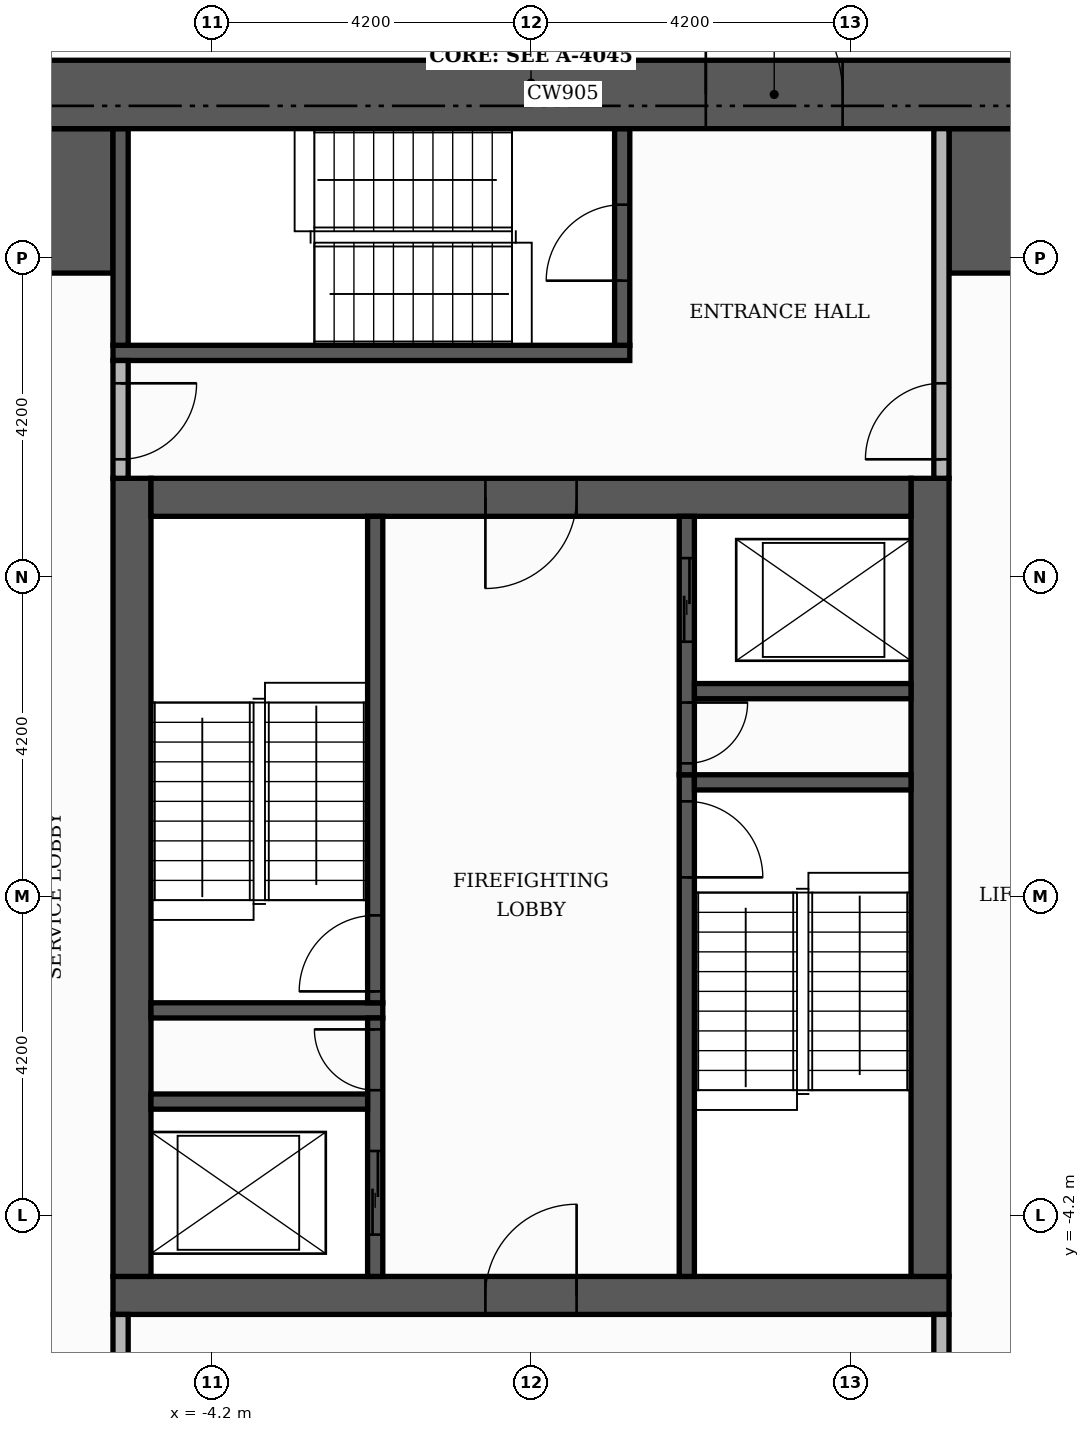
"""IFC4 building model, lengths in metres.
Left out: names, types, materials, properties, quantities, classifications, styles, units other than length and angle.
Written with IfcOpenShell. Run it as: python <this file> out.ifc"""

import sys

from ifc_helpers import new_model, si_unit, direction, frame, frame_2d, origin, place, context, subcontext, project, spatial, rectangle, extrude, element, fill, save


model = new_model("IFC4")
c1 = context("Model", 3, precision=1e-05, world=origin(), true_north=direction((0.0, 1.0)))
c2 = subcontext(c1, "Body", "Model", "MODEL_VIEW")
j1 = project(units=[si_unit("LENGTHUNIT", "METRE"), si_unit("PLANEANGLEUNIT", "RADIAN")], contexts=[c1])
p1 = place(None, origin())
s1 = spatial("IfcSite", under=j1, at=p1, CompositionType="ELEMENT")
p2 = place(p1, origin())
s2 = spatial("IfcBuilding", under=s1, at=p2, CompositionType="ELEMENT")
p3 = place(p2, frame((0.0, 0.0, 283.5)))
s3 = spatial("IfcBuildingStorey", under=s2, at=p3, CompositionType="ELEMENT", Elevation=283.5)
p4 = place(p3, frame((-5.5, -5.25, 0.0), z_axis=(0.0, 0.0, 1.0), x_axis=(1.0, 0.0, 0.0)))
e1 = element("IfcWall", 1, at=p4, inside=s3, PredefinedType="SHEAR", context=c2, shape_type="SweptSolid", body=[
    extrude(rectangle(XDim=11.0, YDim=0.5, at=frame_2d((5.5, 0.0))), origin(), (0.0, 0.0, 1.0), 3.4),
])
p5 = place(p4, frame((4.9, 0.0, 0.0)))
e2 = element("IfcOpeningElement", 2, at=p5, cuts=e1, PredefinedType="OPENING", context=c2, shape_type="SweptSolid", body=[
    extrude(rectangle(XDim=1.2, YDim=2.1, at=frame_2d((0.6, 1.05))), frame((0.0, 0.26, 0.0), z_axis=(0.0, -1.0, 0.0), x_axis=(1.0, 0.0, 0.0)), (0.0, 0.0, 1.0), 0.52),
])
for number, where, z_axis, x_axis in (
    (3, (-5.25, -5.0, 0.0), (0.0, 0.0, 1.0), (0.0, 1.0, 0.0)),
    (4, (5.25, -5.0, 0.0), (0.0, 0.0, 1.0), (0.0, 1.0, 0.0)),
):
    element("IfcWall", number, at=place(p3, frame(where, z_axis=z_axis, x_axis=x_axis)), inside=s3, PredefinedType="SHEAR", context=c2, shape_type="SweptSolid", body=[
        extrude(rectangle(XDim=10.5, YDim=0.5, at=frame_2d((5.25, 0.0))), origin(), (0.0, 0.0, 1.0), 3.4),
    ])
p6 = place(p3, frame((-5.0, 5.25, 0.0), z_axis=(0.0, 0.0, 1.0), x_axis=(1.0, 0.0, 0.0)))
e5 = element("IfcWall", 5, at=p6, inside=s3, PredefinedType="SHEAR", context=c2, shape_type="SweptSolid", body=[
    extrude(rectangle(XDim=10.0, YDim=0.5, at=frame_2d((5.0, 0.0))), origin(), (0.0, 0.0, 1.0), 3.4),
])
p7 = place(p6, frame((4.4, 0.0, 0.0)))
e6 = element("IfcOpeningElement", 6, at=p7, cuts=e5, PredefinedType="OPENING", context=c2, shape_type="SweptSolid", body=[
    extrude(rectangle(XDim=1.2, YDim=2.1, at=frame_2d((0.6, 1.05))), frame((0.0, 0.26, 0.0), z_axis=(0.0, -1.0, 0.0), x_axis=(1.0, 0.0, 0.0)), (0.0, 0.0, 1.0), 0.52),
])
for number, where, z_axis, x_axis in (
    (7, (-10.1, 9.15, 0.0), (0.0, 0.0, 1.0), (1.0, 0.0, 0.0)),
    (8, (5.5, 9.15, 0.0), (0.0, 0.0, 1.0), (1.0, 0.0, 0.0)),
):
    element("IfcWall", number, at=place(p3, frame(where, z_axis=z_axis, x_axis=x_axis)), inside=s3, PredefinedType="SHEAR", context=c2, shape_type="SweptSolid", body=[
        extrude(rectangle(XDim=4.6, YDim=1.9, at=frame_2d((2.3, 0.0))), origin(), (0.0, 0.0, 1.0), 3.4),
    ])
p8 = place(p3, frame((2.05, -5.0, 0.0), z_axis=(0.0, 0.0, 1.0), x_axis=(0.0, 1.0, 0.0)))
e9 = element("IfcWall", 9, at=p8, inside=s3, PredefinedType="SHEAR", context=c2, shape_type="SweptSolid", body=[
    extrude(rectangle(XDim=6.6, YDim=0.2, at=frame_2d((3.3, 0.0))), origin(), (0.0, 0.0, 1.0), 3.4),
])
p9 = place(p8, frame((5.25, 0.0, 0.0)))
e10 = element("IfcOpeningElement", 10, at=p9, cuts=e9, PredefinedType="OPENING", context=c2, shape_type="SweptSolid", body=[
    extrude(rectangle(XDim=1.0, YDim=2.1, at=frame_2d((0.5, 1.05))), frame((0.0, 0.11, 0.0), z_axis=(0.0, -1.0, 0.0), x_axis=(1.0, 0.0, 0.0)), (0.0, 0.0, 1.0), 0.22),
])
p10 = place(p3, frame((-5.0, -1.5, 0.0), z_axis=(0.0, 0.0, 1.0), x_axis=(1.0, 0.0, 0.0)))
e11 = element("IfcWall", 11, at=p10, inside=s3, PredefinedType="SHEAR", context=c2, shape_type="SweptSolid", body=[
    extrude(rectangle(XDim=3.05, YDim=0.2, at=frame_2d((1.525, 0.0))), origin(), (0.0, 0.0, 1.0), 3.4),
])
p11 = place(p3, frame((-2.05, -1.4, 0.0), z_axis=(0.0, 0.0, 1.0), x_axis=(0.0, 1.0, 0.0)))
e12 = element("IfcWall", 12, at=p11, inside=s3, PredefinedType="SHEAR", context=c2, shape_type="SweptSolid", body=[
    extrude(rectangle(XDim=6.4, YDim=0.2, at=frame_2d((3.2, 0.0))), origin(), (0.0, 0.0, 1.0), 3.4),
])
p12 = place(p11, frame((0.15, 0.0, 0.0)))
e13 = element("IfcOpeningElement", 13, at=p12, cuts=e12, PredefinedType="OPENING", context=c2, shape_type="SweptSolid", body=[
    extrude(rectangle(XDim=1.0, YDim=2.1, at=frame_2d((0.5, 1.05))), frame((0.0, 0.11, 0.0), z_axis=(0.0, -1.0, 0.0), x_axis=(1.0, 0.0, 0.0)), (0.0, 0.0, 1.0), 0.22),
])
p13 = place(p3, frame((2.15, 1.5, 0.0), z_axis=(0.0, 0.0, 1.0), x_axis=(1.0, 0.0, 0.0)))
e14 = element("IfcWall", 14, at=p13, inside=s3, PredefinedType="SHEAR", context=c2, shape_type="SweptSolid", body=[
    extrude(rectangle(XDim=2.85, YDim=0.2, at=frame_2d((1.425, 0.0))), origin(), (0.0, 0.0, 1.0), 3.4),
])
p14 = place(p3, frame((-5.5, 7.15, 0.0), z_axis=(0.0, 0.0, 1.0), x_axis=(1.0, 0.0, 0.0)))
e15 = element("IfcWall", 15, at=p14, inside=s3, PredefinedType="SHEAR", context=c2, shape_type="SweptSolid", body=[
    extrude(rectangle(XDim=6.8, YDim=0.2, at=frame_2d((3.4, 0.0))), origin(), (0.0, 0.0, 1.0), 3.4),
])
p15 = place(p3, frame((-5.4, 7.25, 0.0), z_axis=(0.0, 0.0, 1.0), x_axis=(0.0, 1.0, 0.0)))
e16 = element("IfcWall", 16, at=p15, inside=s3, PredefinedType="SHEAR", context=c2, shape_type="SweptSolid", body=[
    extrude(rectangle(XDim=2.85, YDim=0.2, at=frame_2d((1.425, 0.0))), origin(), (0.0, 0.0, 1.0), 3.4),
])
p16 = place(p3, frame((1.2, 7.25, 0.0), z_axis=(0.0, 0.0, 1.0), x_axis=(0.0, 1.0, 0.0)))
e17 = element("IfcWall", 17, at=p16, inside=s3, PredefinedType="SHEAR", context=c2, shape_type="SweptSolid", body=[
    extrude(rectangle(XDim=2.85, YDim=0.2, at=frame_2d((1.425, 0.0))), origin(), (0.0, 0.0, 1.0), 3.4),
])
p17 = place(p16, frame((0.85, 0.0, 0.0)))
e18 = element("IfcOpeningElement", 18, at=p17, cuts=e17, PredefinedType="OPENING", context=c2, shape_type="SweptSolid", body=[
    extrude(rectangle(XDim=1.0, YDim=2.1, at=frame_2d((0.5, 1.05))), frame((0.0, 0.11, 0.0), z_axis=(0.0, -1.0, 0.0), x_axis=(1.0, 0.0, 0.0)), (0.0, 0.0, 1.0), 0.22),
])
p18 = place(p3, frame((-2.05, -5.0, 0.0), z_axis=(0.0, 0.0, 1.0), x_axis=(0.0, 1.0, 0.0)))
e19 = element("IfcWall", 19, at=p18, inside=s3, PredefinedType="SHEAR", context=c2, shape_type="SweptSolid", body=[
    extrude(rectangle(XDim=3.4, YDim=0.2, at=frame_2d((1.7, 0.0))), origin(), (0.0, 0.0, 1.0), 3.4),
])
p19 = place(p18, frame((0.55, 0.0, 0.0)))
e20 = element("IfcOpeningElement", 20, at=p19, cuts=e19, PredefinedType="OPENING", context=c2, shape_type="SweptSolid", body=[
    extrude(rectangle(XDim=1.1, YDim=2.1, at=frame_2d((0.55, 1.05))), frame((0.0, 0.11, 0.0), z_axis=(0.0, -1.0, 0.0), x_axis=(1.0, 0.0, 0.0)), (0.0, 0.0, 1.0), 0.22),
])
p20 = place(p18, frame((2.45, 0.0, 0.0)))
e21 = element("IfcOpeningElement", 21, at=p20, cuts=e19, PredefinedType="OPENING", context=c2, shape_type="SweptSolid", body=[
    extrude(rectangle(XDim=0.8, YDim=2.1, at=frame_2d((0.4, 1.05))), frame((0.0, 0.11, 0.0), z_axis=(0.0, -1.0, 0.0), x_axis=(1.0, 0.0, 0.0)), (0.0, 0.0, 1.0), 0.22),
])
p21 = place(p3, frame((-5.0, -2.7, 0.0), z_axis=(0.0, 0.0, 1.0), x_axis=(1.0, 0.0, 0.0)))
e22 = element("IfcWall", 22, at=p21, inside=s3, PredefinedType="SHEAR", context=c2, shape_type="SweptSolid", body=[
    extrude(rectangle(XDim=2.85, YDim=0.2, at=frame_2d((1.425, 0.0))), origin(), (0.0, 0.0, 1.0), 3.4),
])
p22 = place(p3, frame((2.05, 1.6, 0.0), z_axis=(0.0, 0.0, 1.0), x_axis=(0.0, 1.0, 0.0)))
e23 = element("IfcWall", 23, at=p22, inside=s3, PredefinedType="SHEAR", context=c2, shape_type="SweptSolid", body=[
    extrude(rectangle(XDim=3.4, YDim=0.2, at=frame_2d((1.7, 0.0))), origin(), (0.0, 0.0, 1.0), 3.4),
])
p23 = place(p22, frame((1.75, 0.0, 0.0)))
e24 = element("IfcOpeningElement", 24, at=p23, cuts=e23, PredefinedType="OPENING", context=c2, shape_type="SweptSolid", body=[
    extrude(rectangle(XDim=1.1, YDim=2.1, at=frame_2d((0.55, 1.05))), frame((0.0, 0.11, 0.0), z_axis=(0.0, -1.0, 0.0), x_axis=(1.0, 0.0, 0.0)), (0.0, 0.0, 1.0), 0.22),
])
p24 = place(p22, frame((0.15, 0.0, 0.0)))
e25 = element("IfcOpeningElement", 25, at=p24, cuts=e23, PredefinedType="OPENING", context=c2, shape_type="SweptSolid", body=[
    extrude(rectangle(XDim=0.8, YDim=2.1, at=frame_2d((0.4, 1.05))), frame((0.0, 0.11, 0.0), z_axis=(0.0, -1.0, 0.0), x_axis=(1.0, 0.0, 0.0)), (0.0, 0.0, 1.0), 0.22),
])
p25 = place(p3, frame((2.15, 2.7, 0.0), z_axis=(0.0, 0.0, 1.0), x_axis=(1.0, 0.0, 0.0)))
e26 = element("IfcWall", 26, at=p25, inside=s3, PredefinedType="SHEAR", context=c2, shape_type="SweptSolid", body=[
    extrude(rectangle(XDim=2.85, YDim=0.2, at=frame_2d((1.425, 0.0))), origin(), (0.0, 0.0, 1.0), 3.4),
])
p26 = place(p3, frame((-11.0, 10.55, 0.0), z_axis=(0.0, 0.0, 1.0), x_axis=(1.0, 0.0, 0.0)))
e27 = element("IfcWall", 27, at=p26, inside=s3, PredefinedType="SHEAR", context=c2, shape_type="SweptSolid", body=[
    extrude(rectangle(XDim=22.0, YDim=0.9, at=frame_2d((11.0, 0.0))), origin(), (0.0, 0.0, 1.0), 3.4),
])
p27 = place(p26, frame((13.3, 0.0, 0.0)))
e28 = element("IfcOpeningElement", 28, at=p27, cuts=e27, PredefinedType="OPENING", context=c2, shape_type="SweptSolid", body=[
    extrude(rectangle(XDim=1.8, YDim=2.2, at=frame_2d((0.9, 1.1))), frame((0.0, 0.46, 0.0), z_axis=(0.0, -1.0, 0.0), x_axis=(1.0, 0.0, 0.0)), (0.0, 0.0, 1.0), 0.92),
])
p28 = place(p3, frame((-5.4, -10.1, 0.0), z_axis=(0.0, 0.0, 1.0), x_axis=(0.0, 1.0, 0.0)))
e29 = element("IfcWall", 29, at=p28, inside=s3, PredefinedType="PARTITIONING", context=c2, shape_type="SweptSolid", body=[
    extrude(rectangle(XDim=4.6, YDim=0.2, at=frame_2d((2.3, 0.0))), origin(), (0.0, 0.0, 1.0), 3.4),
])
p29 = place(p28, frame((2.9, 0.0, 0.0)))
e30 = element("IfcOpeningElement", 30, at=p29, cuts=e29, PredefinedType="OPENING", context=c2, shape_type="SweptSolid", body=[
    extrude(rectangle(XDim=1.0, YDim=2.1, at=frame_2d((0.5, 1.05))), frame((0.0, 0.11, 0.0), z_axis=(0.0, -1.0, 0.0), x_axis=(1.0, 0.0, 0.0)), (0.0, 0.0, 1.0), 0.22),
])
p30 = place(p3, frame((5.4, -10.1, 0.0), z_axis=(0.0, 0.0, 1.0), x_axis=(0.0, 1.0, 0.0)))
e31 = element("IfcWall", 31, at=p30, inside=s3, PredefinedType="PARTITIONING", context=c2, shape_type="SweptSolid", body=[
    extrude(rectangle(XDim=4.6, YDim=0.2, at=frame_2d((2.3, 0.0))), origin(), (0.0, 0.0, 1.0), 3.4),
])
p31 = place(p30, frame((2.9, 0.0, 0.0)))
e32 = element("IfcOpeningElement", 32, at=p31, cuts=e31, PredefinedType="OPENING", context=c2, shape_type="SweptSolid", body=[
    extrude(rectangle(XDim=1.0, YDim=2.1, at=frame_2d((0.5, 1.05))), frame((0.0, 0.11, 0.0), z_axis=(0.0, -1.0, 0.0), x_axis=(1.0, 0.0, 0.0)), (0.0, 0.0, 1.0), 0.22),
])
p32 = place(p3, frame((-5.4, 5.5, 0.0), z_axis=(0.0, 0.0, 1.0), x_axis=(0.0, 1.0, 0.0)))
e33 = element("IfcWall", 33, at=p32, inside=s3, PredefinedType="PARTITIONING", context=c2, shape_type="SweptSolid", body=[
    extrude(rectangle(XDim=1.55, YDim=0.2, at=frame_2d((0.775, 0.0))), origin(), (0.0, 0.0, 1.0), 3.4),
])
p33 = place(p32, frame((0.25, 0.0, 0.0)))
e34 = element("IfcOpeningElement", 34, at=p33, cuts=e33, PredefinedType="OPENING", context=c2, shape_type="SweptSolid", body=[
    extrude(rectangle(XDim=1.0, YDim=2.1, at=frame_2d((0.5, 1.05))), frame((0.0, 0.11, 0.0), z_axis=(0.0, -1.0, 0.0), x_axis=(1.0, 0.0, 0.0)), (0.0, 0.0, 1.0), 0.22),
])
p34 = place(p3, frame((5.4, 5.5, 0.0), z_axis=(0.0, 0.0, 1.0), x_axis=(0.0, 1.0, 0.0)))
e35 = element("IfcWall", 35, at=p34, inside=s3, PredefinedType="PARTITIONING", context=c2, shape_type="SweptSolid", body=[
    extrude(rectangle(XDim=4.6, YDim=0.2, at=frame_2d((2.3, 0.0))), origin(), (0.0, 0.0, 1.0), 3.4),
])
p35 = place(p34, frame((0.25, 0.0, 0.0)))
e36 = element("IfcOpeningElement", 36, at=p35, cuts=e35, PredefinedType="OPENING", context=c2, shape_type="SweptSolid", body=[
    extrude(rectangle(XDim=1.0, YDim=2.1, at=frame_2d((0.5, 1.05))), frame((0.0, 0.11, 0.0), z_axis=(0.0, -1.0, 0.0), x_axis=(1.0, 0.0, 0.0)), (0.0, 0.0, 1.0), 0.22),
])
p36 = place(p23, origin())
e37 = element("IfcDoor", 37, at=p36, inside=s3, OperationType="SLIDING_TO_LEFT", PredefinedType="DOOR", context=c2, shape_type="SweptSolid", body=[
    extrude(rectangle(XDim=1.1, YDim=2.1, at=frame_2d((0.55, 1.05))), frame((0.0, 0.025, 0.0), z_axis=(0.0, -1.0, 0.0), x_axis=(1.0, 0.0, 0.0)), (0.0, 0.0, 1.0), 0.05),
])
fill(e24, e37)
p37 = place(p19, origin())
e38 = element("IfcDoor", 38, at=p37, inside=s3, OperationType="SLIDING_TO_LEFT", PredefinedType="DOOR", context=c2, shape_type="SweptSolid", body=[
    extrude(rectangle(XDim=1.1, YDim=2.1, at=frame_2d((0.55, 1.05))), frame((0.0, 0.025, 0.0), z_axis=(0.0, -1.0, 0.0), x_axis=(1.0, 0.0, 0.0)), (0.0, 0.0, 1.0), 0.05),
])
fill(e20, e38)
p38 = place(p12, origin())
e39 = element("IfcDoor", 39, at=p38, inside=s3, OperationType="SINGLE_SWING_LEFT", PredefinedType="DOOR", context=c2, shape_type="SweptSolid", body=[
    extrude(rectangle(XDim=1.0, YDim=2.1, at=frame_2d((0.5, 1.05))), frame((0.0, 0.025, 0.0), z_axis=(0.0, -1.0, 0.0), x_axis=(1.0, 0.0, 0.0)), (0.0, 0.0, 1.0), 0.05),
])
fill(e13, e39)
p39 = place(p9, frame((1.0, 0.0, 0.0), z_axis=(0.0, 0.0, 1.0), x_axis=(-1.0, 0.0, 0.0)))
e40 = element("IfcDoor", 40, at=p39, inside=s3, OperationType="SINGLE_SWING_LEFT", PredefinedType="DOOR", context=c2, shape_type="SweptSolid", body=[
    extrude(rectangle(XDim=1.0, YDim=2.1, at=frame_2d((0.5, 1.05))), frame((0.0, 0.025, 0.0), z_axis=(0.0, -1.0, 0.0), x_axis=(1.0, 0.0, 0.0)), (0.0, 0.0, 1.0), 0.05),
])
fill(e10, e40)
p40 = place(p24, frame((0.8, 0.0, 0.0), z_axis=(0.0, 0.0, 1.0), x_axis=(-1.0, 0.0, 0.0)))
e41 = element("IfcDoor", 41, at=p40, inside=s3, OperationType="SINGLE_SWING_RIGHT", PredefinedType="DOOR", context=c2, shape_type="SweptSolid", body=[
    extrude(rectangle(XDim=0.8, YDim=2.1, at=frame_2d((0.4, 1.05))), frame((0.0, 0.025, 0.0), z_axis=(0.0, -1.0, 0.0), x_axis=(1.0, 0.0, 0.0)), (0.0, 0.0, 1.0), 0.05),
])
fill(e25, e41)
p41 = place(p20, origin())
e42 = element("IfcDoor", 42, at=p41, inside=s3, OperationType="SINGLE_SWING_RIGHT", PredefinedType="DOOR", context=c2, shape_type="SweptSolid", body=[
    extrude(rectangle(XDim=0.8, YDim=2.1, at=frame_2d((0.4, 1.05))), frame((0.0, 0.025, 0.0), z_axis=(0.0, -1.0, 0.0), x_axis=(1.0, 0.0, 0.0)), (0.0, 0.0, 1.0), 0.05),
])
fill(e21, e42)
p42 = place(p7, frame((1.2, 0.0, 0.0), z_axis=(0.0, 0.0, 1.0), x_axis=(-1.0, 0.0, 0.0)))
e43 = element("IfcDoor", 43, at=p42, inside=s3, OperationType="SINGLE_SWING_LEFT", PredefinedType="DOOR", context=c2, shape_type="SweptSolid", body=[
    extrude(rectangle(XDim=1.2, YDim=2.1, at=frame_2d((0.6, 1.05))), frame((0.0, 0.025, 0.0), z_axis=(0.0, -1.0, 0.0), x_axis=(1.0, 0.0, 0.0)), (0.0, 0.0, 1.0), 0.05),
])
fill(e6, e43)
p43 = place(p5, origin())
e44 = element("IfcDoor", 44, at=p43, inside=s3, OperationType="SINGLE_SWING_RIGHT", PredefinedType="DOOR", context=c2, shape_type="SweptSolid", body=[
    extrude(rectangle(XDim=1.2, YDim=2.1, at=frame_2d((0.6, 1.05))), frame((0.0, 0.025, 0.0), z_axis=(0.0, -1.0, 0.0), x_axis=(1.0, 0.0, 0.0)), (0.0, 0.0, 1.0), 0.05),
])
fill(e2, e44)
p44 = place(p17, origin())
e45 = element("IfcDoor", 45, at=p44, inside=s3, OperationType="SINGLE_SWING_LEFT", PredefinedType="DOOR", context=c2, shape_type="SweptSolid", body=[
    extrude(rectangle(XDim=1.0, YDim=2.1, at=frame_2d((0.5, 1.05))), frame((0.0, 0.025, 0.0), z_axis=(0.0, -1.0, 0.0), x_axis=(1.0, 0.0, 0.0)), (0.0, 0.0, 1.0), 0.05),
])
fill(e18, e45)
p45 = place(p33, frame((1.0, 0.0, 0.0), z_axis=(0.0, 0.0, 1.0), x_axis=(-1.0, 0.0, 0.0)))
e46 = element("IfcDoor", 46, at=p45, inside=s3, OperationType="SINGLE_SWING_RIGHT", PredefinedType="DOOR", context=c2, shape_type="SweptSolid", body=[
    extrude(rectangle(XDim=1.0, YDim=2.1, at=frame_2d((0.5, 1.05))), frame((0.0, 0.025, 0.0), z_axis=(0.0, -1.0, 0.0), x_axis=(1.0, 0.0, 0.0)), (0.0, 0.0, 1.0), 0.05),
])
fill(e34, e46)
p46 = place(p35, origin())
e47 = element("IfcDoor", 47, at=p46, inside=s3, OperationType="SINGLE_SWING_LEFT", PredefinedType="DOOR", context=c2, shape_type="SweptSolid", body=[
    extrude(rectangle(XDim=1.0, YDim=2.1, at=frame_2d((0.5, 1.05))), frame((0.0, 0.025, 0.0), z_axis=(0.0, -1.0, 0.0), x_axis=(1.0, 0.0, 0.0)), (0.0, 0.0, 1.0), 0.05),
])
fill(e36, e47)
p47 = place(p27, origin())
e48 = element("IfcDoor", 48, at=p47, inside=s3, OperationType="DOUBLE_DOOR_SINGLE_SWING", PredefinedType="DOOR", context=c2, shape_type="SweptSolid", body=[
    extrude(rectangle(XDim=1.8, YDim=2.2, at=frame_2d((0.9, 1.1))), frame((0.0, 0.025, 0.0), z_axis=(0.0, -1.0, 0.0), x_axis=(1.0, 0.0, 0.0)), (0.0, 0.0, 1.0), 0.05),
])
fill(e28, e48)
save(model, sys.argv[1])
